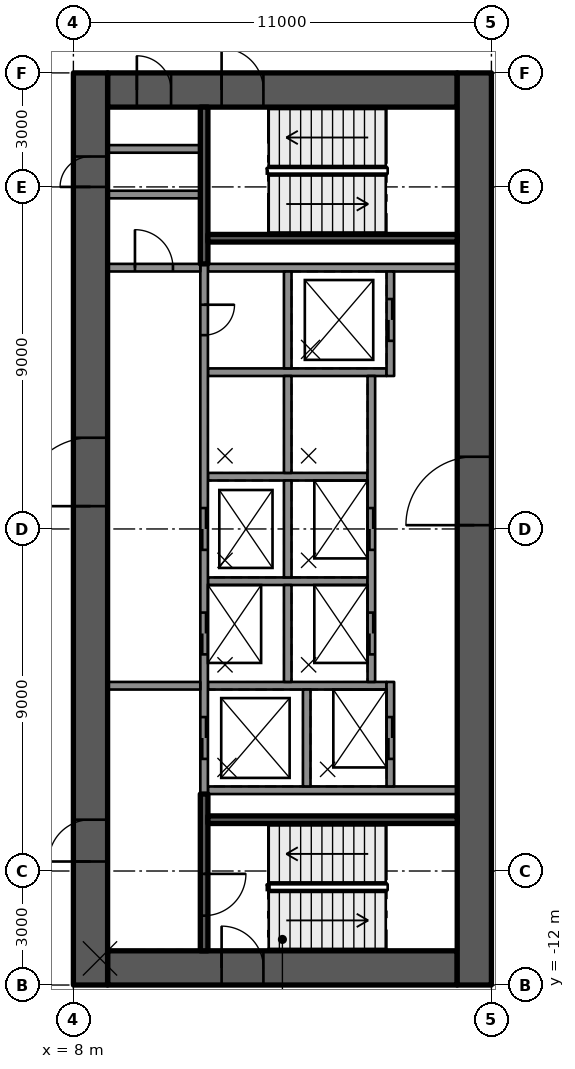
"""IFC4 building model, lengths in metres.
Left out: names, types, materials, properties, quantities, classifications, styles, units other than length and angle.
Written with IfcOpenShell. Run it as: python <this file> out.ifc"""

import sys

from ifc_helpers import new_model, si_unit, direction, frame, frame_2d, origin, place, context, subcontext, project, spatial, rectangle, extrude, element, fill, save


model = new_model("IFC4")
c1 = context("Model", 3, precision=1e-05, world=origin(), true_north=direction((0.0, 1.0)))
c2 = subcontext(c1, "Body", "Model", "MODEL_VIEW")
j1 = project(units=[si_unit("LENGTHUNIT", "METRE"), si_unit("PLANEANGLEUNIT", "RADIAN")], contexts=[c1])
p1 = place(None, origin())
s1 = spatial("IfcSite", under=j1, at=p1, CompositionType="ELEMENT")
p2 = place(p1, origin())
s2 = spatial("IfcBuilding", under=s1, at=p2, CompositionType="ELEMENT")
p3 = place(p2, frame((0.0, 0.0, 54.8)))
s3 = spatial("IfcBuildingStorey", under=s2, at=p3, CompositionType="ELEMENT", Elevation=54.8)
p4 = place(p3, frame((8.9, 11.55, 0.0), z_axis=(0.0, 0.0, 1.0), x_axis=(1.0, 0.0, 0.0)))
e1 = element("IfcWall", 1, at=p4, inside=s3, PredefinedType="SHEAR", context=c2, shape_type="SweptSolid", body=[
    extrude(rectangle(XDim=9.2, YDim=0.9, at=frame_2d((4.6, 0.0))), origin(), (0.0, 0.0, 1.0), 4.0),
])
p5 = place(p4, frame((3.0, 0.0, 0.0)))
e2 = element("IfcOpeningElement", 2, at=p5, cuts=e1, PredefinedType="OPENING", context=c2, shape_type="SweptSolid", body=[
    extrude(rectangle(XDim=1.1, YDim=2.1, at=frame_2d((0.55, 1.05))), frame((0.0, 0.46, 0.0), z_axis=(0.0, -1.0, 0.0), x_axis=(1.0, 0.0, 0.0)), (0.0, 0.0, 1.0), 0.92),
])
p6 = place(p4, frame((0.77, 0.0, 0.0)))
e3 = element("IfcOpeningElement", 3, at=p6, cuts=e1, PredefinedType="OPENING", context=c2, shape_type="SweptSolid", body=[
    extrude(rectangle(XDim=0.9, YDim=2.1, at=frame_2d((0.45, 1.05))), frame((0.0, 0.46, 0.0), z_axis=(0.0, -1.0, 0.0), x_axis=(1.0, 0.0, 0.0)), (0.0, 0.0, 1.0), 0.92),
])
p7 = place(p3, frame((8.9, -11.55, 0.0), z_axis=(0.0, 0.0, 1.0), x_axis=(1.0, 0.0, 0.0)))
e4 = element("IfcWall", 4, at=p7, inside=s3, PredefinedType="SHEAR", context=c2, shape_type="SweptSolid", body=[
    extrude(rectangle(XDim=9.2, YDim=0.9, at=frame_2d((4.6, 0.0))), origin(), (0.0, 0.0, 1.0), 4.0),
])
p8 = place(p7, frame((3.0, 0.0, 0.0)))
e5 = element("IfcOpeningElement", 5, at=p8, cuts=e4, PredefinedType="OPENING", context=c2, shape_type="SweptSolid", body=[
    extrude(rectangle(XDim=1.1, YDim=2.1, at=frame_2d((0.55, 1.05))), frame((0.0, 0.46, 0.0), z_axis=(0.0, -1.0, 0.0), x_axis=(1.0, 0.0, 0.0)), (0.0, 0.0, 1.0), 0.92),
])
p9 = place(p3, frame((8.45, -12.0, 0.0), z_axis=(0.0, 0.0, 1.0), x_axis=(0.0, 1.0, 0.0)))
e6 = element("IfcWall", 6, at=p9, inside=s3, PredefinedType="SHEAR", context=c2, shape_type="SweptSolid", body=[
    extrude(rectangle(XDim=24.0, YDim=0.9, at=frame_2d((12.0, 0.0))), origin(), (0.0, 0.0, 1.0), 4.0),
])
p10 = place(p9, frame((12.6, 0.0, 0.0)))
e7 = element("IfcOpeningElement", 7, at=p10, cuts=e6, PredefinedType="OPENING", context=c2, shape_type="SweptSolid", body=[
    extrude(rectangle(XDim=1.8, YDim=2.1, at=frame_2d((0.9, 1.05))), frame((0.0, 0.46, 0.0), z_axis=(0.0, -1.0, 0.0), x_axis=(1.0, 0.0, 0.0)), (0.0, 0.0, 1.0), 0.92),
])
p11 = place(p9, frame((3.25, 0.0, 0.0)))
e8 = element("IfcOpeningElement", 8, at=p11, cuts=e6, PredefinedType="OPENING", context=c2, shape_type="SweptSolid", body=[
    extrude(rectangle(XDim=1.1, YDim=2.1, at=frame_2d((0.55, 1.05))), frame((0.0, 0.46, 0.0), z_axis=(0.0, -1.0, 0.0), x_axis=(1.0, 0.0, 0.0)), (0.0, 0.0, 1.0), 0.92),
])
p12 = place(p9, frame((21.0, 0.0, 0.0)))
e9 = element("IfcOpeningElement", 9, at=p12, cuts=e6, PredefinedType="OPENING", context=c2, shape_type="SweptSolid", body=[
    extrude(rectangle(XDim=0.8, YDim=2.1, at=frame_2d((0.4, 1.05))), frame((0.0, 0.46, 0.0), z_axis=(0.0, -1.0, 0.0), x_axis=(1.0, 0.0, 0.0)), (0.0, 0.0, 1.0), 0.92),
])
p13 = place(p3, frame((18.55, -12.0, 0.0), z_axis=(0.0, 0.0, 1.0), x_axis=(0.0, 1.0, 0.0)))
e10 = element("IfcWall", 10, at=p13, inside=s3, PredefinedType="SHEAR", context=c2, shape_type="SweptSolid", body=[
    extrude(rectangle(XDim=24.0, YDim=0.9, at=frame_2d((12.0, 0.0))), origin(), (0.0, 0.0, 1.0), 4.0),
])
p14 = place(p13, frame((12.1, 0.0, 0.0)))
e11 = element("IfcOpeningElement", 11, at=p14, cuts=e10, PredefinedType="OPENING", context=c2, shape_type="SweptSolid", body=[
    extrude(rectangle(XDim=1.8, YDim=2.1, at=frame_2d((0.9, 1.05))), frame((0.0, 0.46, 0.0), z_axis=(0.0, -1.0, 0.0), x_axis=(1.0, 0.0, 0.0)), (0.0, 0.0, 1.0), 0.92),
])
for number, where, z_axis, x_axis in (
    (12, (11.54, -6.875, 0.0), (0.0, 0.0, 1.0), (1.0, 0.0, 0.0)),
    (13, (11.54, 6.875, 0.0), (0.0, 0.0, 1.0), (1.0, 0.0, 0.0)),
):
    element("IfcWall", number, at=place(p3, frame(where, z_axis=z_axis, x_axis=x_axis)), inside=s3, PredefinedType="SOLIDWALL", context=c2, shape_type="SweptSolid", body=[
        extrude(rectangle(XDim=6.56, YDim=0.2, at=frame_2d((3.28, 0.0))), origin(), (0.0, 0.0, 1.0), 3.59),
    ])
p15 = place(p3, frame((11.54, 4.125, 0.0), z_axis=(0.0, 0.0, 1.0), x_axis=(1.0, 0.0, 0.0)))
e14 = element("IfcWall", 14, at=p15, inside=s3, PredefinedType="SOLIDWALL", context=c2, shape_type="SweptSolid", body=[
    extrude(rectangle(XDim=4.7, YDim=0.2, at=frame_2d((2.35, 0.0))), origin(), (0.0, 0.0, 1.0), 3.59),
])
for number, where, z_axis, x_axis in (
    (15, (11.54, 1.375, 0.0), (0.0, 0.0, 1.0), (1.0, 0.0, 0.0)),
    (16, (11.54, -1.375, 0.0), (0.0, 0.0, 1.0), (1.0, 0.0, 0.0)),
):
    element("IfcWall", number, at=place(p3, frame(where, z_axis=z_axis, x_axis=x_axis)), inside=s3, PredefinedType="SOLIDWALL", context=c2, shape_type="SweptSolid", body=[
        extrude(rectangle(XDim=4.2, YDim=0.2, at=frame_2d((2.1, 0.0))), origin(), (0.0, 0.0, 1.0), 3.59),
    ])
p16 = place(p3, frame((11.54, -4.125, 0.0), z_axis=(0.0, 0.0, 1.0), x_axis=(1.0, 0.0, 0.0)))
e17 = element("IfcWall", 17, at=p16, inside=s3, PredefinedType="SOLIDWALL", context=c2, shape_type="SweptSolid", body=[
    extrude(rectangle(XDim=4.7, YDim=0.2, at=frame_2d((2.35, 0.0))), origin(), (0.0, 0.0, 1.0), 3.59),
])
p17 = place(p3, frame((11.44, 6.975, 0.0), z_axis=(0.0, 0.0, 1.0), x_axis=(0.0, -1.0, 0.0)))
e18 = element("IfcWall", 18, at=p17, inside=s3, PredefinedType="SOLIDWALL", context=c2, shape_type="SweptSolid", body=[
    extrude(rectangle(XDim=13.95, YDim=0.2, at=frame_2d((6.975, 0.0))), origin(), (0.0, 0.0, 1.0), 3.59),
])
p18 = place(p17, frame((6.425, 0.0, 0.0)))
e19 = element("IfcOpeningElement", 19, at=p18, cuts=e18, PredefinedType="OPENING", context=c2, shape_type="SweptSolid", body=[
    extrude(rectangle(XDim=1.1, YDim=2.1, at=frame_2d((0.55, 1.05))), frame((0.0, 0.11, 0.0), z_axis=(0.0, -1.0, 0.0), x_axis=(1.0, 0.0, 0.0)), (0.0, 0.0, 1.0), 0.22),
])
p19 = place(p17, frame((9.175, 0.0, 0.0)))
e20 = element("IfcOpeningElement", 20, at=p19, cuts=e18, PredefinedType="OPENING", context=c2, shape_type="SweptSolid", body=[
    extrude(rectangle(XDim=1.1, YDim=2.1, at=frame_2d((0.55, 1.05))), frame((0.0, 0.11, 0.0), z_axis=(0.0, -1.0, 0.0), x_axis=(1.0, 0.0, 0.0)), (0.0, 0.0, 1.0), 0.22),
])
p20 = place(p17, frame((11.925, 0.0, 0.0)))
e21 = element("IfcOpeningElement", 21, at=p20, cuts=e18, PredefinedType="OPENING", context=c2, shape_type="SweptSolid", body=[
    extrude(rectangle(XDim=1.1, YDim=2.1, at=frame_2d((0.55, 1.05))), frame((0.0, 0.11, 0.0), z_axis=(0.0, -1.0, 0.0), x_axis=(1.0, 0.0, 0.0)), (0.0, 0.0, 1.0), 0.22),
])
p21 = place(p17, frame((1.075, 0.0, 0.0)))
e22 = element("IfcOpeningElement", 22, at=p21, cuts=e18, PredefinedType="OPENING", context=c2, shape_type="SweptSolid", body=[
    extrude(rectangle(XDim=0.8, YDim=2.1, at=frame_2d((0.4, 1.05))), frame((0.0, 0.11, 0.0), z_axis=(0.0, -1.0, 0.0), x_axis=(1.0, 0.0, 0.0)), (0.0, 0.0, 1.0), 0.22),
])
for number, where, z_axis, x_axis in (
    (23, (13.64, 6.775, 0.0), (0.0, 0.0, 1.0), (0.0, -1.0, 0.0)),
    (24, (13.64, 4.025, 0.0), (0.0, 0.0, 1.0), (0.0, -1.0, 0.0)),
    (25, (13.64, 1.275, 0.0), (0.0, 0.0, 1.0), (0.0, -1.0, 0.0)),
    (26, (13.64, -1.475, 0.0), (0.0, 0.0, 1.0), (0.0, -1.0, 0.0)),
    (27, (14.14, -4.225, 0.0), (0.0, 0.0, 1.0), (0.0, -1.0, 0.0)),
):
    element("IfcWall", number, at=place(p3, frame(where, z_axis=z_axis, x_axis=x_axis)), inside=s3, PredefinedType="SOLIDWALL", context=c2, shape_type="SweptSolid", body=[
        extrude(rectangle(XDim=2.55, YDim=0.2, at=frame_2d((1.275, 0.0))), origin(), (0.0, 0.0, 1.0), 3.59),
    ])
p22 = place(p3, frame((16.34, 6.775, 0.0), z_axis=(0.0, 0.0, 1.0), x_axis=(0.0, -1.0, 0.0)))
e28 = element("IfcWall", 28, at=p22, inside=s3, PredefinedType="SOLIDWALL", context=c2, shape_type="SweptSolid", body=[
    extrude(rectangle(XDim=2.75, YDim=0.2, at=frame_2d((1.375, 0.0))), origin(), (0.0, 0.0, 1.0), 3.59),
])
p23 = place(p22, frame((0.725, 0.0, 0.0)))
e29 = element("IfcOpeningElement", 29, at=p23, cuts=e28, PredefinedType="OPENING", context=c2, shape_type="SweptSolid", body=[
    extrude(rectangle(XDim=1.1, YDim=2.1, at=frame_2d((0.55, 1.05))), frame((0.0, 0.11, 0.0), z_axis=(0.0, -1.0, 0.0), x_axis=(1.0, 0.0, 0.0)), (0.0, 0.0, 1.0), 0.22),
])
p24 = place(p3, frame((15.84, 4.025, 0.0), z_axis=(0.0, 0.0, 1.0), x_axis=(0.0, -1.0, 0.0)))
e30 = element("IfcWall", 30, at=p24, inside=s3, PredefinedType="SOLIDWALL", context=c2, shape_type="SweptSolid", body=[
    extrude(rectangle(XDim=8.05, YDim=0.2, at=frame_2d((4.025, 0.0))), origin(), (0.0, 0.0, 1.0), 3.59),
])
p25 = place(p24, frame((3.475, 0.0, 0.0)))
e31 = element("IfcOpeningElement", 31, at=p25, cuts=e30, PredefinedType="OPENING", context=c2, shape_type="SweptSolid", body=[
    extrude(rectangle(XDim=1.1, YDim=2.1, at=frame_2d((0.55, 1.05))), frame((0.0, 0.11, 0.0), z_axis=(0.0, -1.0, 0.0), x_axis=(1.0, 0.0, 0.0)), (0.0, 0.0, 1.0), 0.22),
])
p26 = place(p24, frame((6.225, 0.0, 0.0)))
e32 = element("IfcOpeningElement", 32, at=p26, cuts=e30, PredefinedType="OPENING", context=c2, shape_type="SweptSolid", body=[
    extrude(rectangle(XDim=1.1, YDim=2.1, at=frame_2d((0.55, 1.05))), frame((0.0, 0.11, 0.0), z_axis=(0.0, -1.0, 0.0), x_axis=(1.0, 0.0, 0.0)), (0.0, 0.0, 1.0), 0.22),
])
p27 = place(p3, frame((16.34, -4.025, 0.0), z_axis=(0.0, 0.0, 1.0), x_axis=(0.0, -1.0, 0.0)))
e33 = element("IfcWall", 33, at=p27, inside=s3, PredefinedType="SOLIDWALL", context=c2, shape_type="SweptSolid", body=[
    extrude(rectangle(XDim=2.75, YDim=0.2, at=frame_2d((1.375, 0.0))), origin(), (0.0, 0.0, 1.0), 3.59),
])
p28 = place(p27, frame((0.925, 0.0, 0.0)))
e34 = element("IfcOpeningElement", 34, at=p28, cuts=e33, PredefinedType="OPENING", context=c2, shape_type="SweptSolid", body=[
    extrude(rectangle(XDim=1.1, YDim=2.1, at=frame_2d((0.55, 1.05))), frame((0.0, 0.11, 0.0), z_axis=(0.0, -1.0, 0.0), x_axis=(1.0, 0.0, 0.0)), (0.0, 0.0, 1.0), 0.22),
])
p29 = place(p3, frame((11.44, -6.975, 0.0), z_axis=(0.0, 0.0, 1.0), x_axis=(0.0, -1.0, 0.0)))
e35 = element("IfcWall", 35, at=p29, inside=s3, PredefinedType="SOLIDWALL", context=c2, shape_type="SweptSolid", body=[
    extrude(rectangle(XDim=4.125, YDim=0.2, at=frame_2d((2.062, 0.0))), origin(), (0.0, 0.0, 1.0), 3.59),
])
p30 = place(p29, frame((2.1, 0.0, 0.0)))
e36 = element("IfcOpeningElement", 36, at=p30, cuts=e35, PredefinedType="OPENING", context=c2, shape_type="SweptSolid", body=[
    extrude(rectangle(XDim=1.1, YDim=2.1, at=frame_2d((0.55, 1.05))), frame((0.0, 0.11, 0.0), z_axis=(0.0, -1.0, 0.0), x_axis=(1.0, 0.0, 0.0)), (0.0, 0.0, 1.0), 0.22),
])
p31 = place(p3, frame((11.54, -7.65, 0.0), z_axis=(0.0, 0.0, 1.0), x_axis=(1.0, 0.0, 0.0)))
e37 = element("IfcWall", 37, at=p31, inside=s3, PredefinedType="SOLIDWALL", context=c2, shape_type="SweptSolid", body=[
    extrude(rectangle(XDim=6.56, YDim=0.2, at=frame_2d((3.28, 0.0))), origin(), (0.0, 0.0, 1.0), 3.59),
])
p32 = place(p3, frame((11.44, 11.1, 0.0), z_axis=(0.0, 0.0, 1.0), x_axis=(0.0, -1.0, 0.0)))
e38 = element("IfcWall", 38, at=p32, inside=s3, PredefinedType="SOLIDWALL", context=c2, shape_type="SweptSolid", body=[
    extrude(rectangle(XDim=4.125, YDim=0.2, at=frame_2d((2.062, 0.0))), origin(), (0.0, 0.0, 1.0), 3.59),
])
p33 = place(p3, frame((11.54, 7.65, 0.0), z_axis=(0.0, 0.0, 1.0), x_axis=(1.0, 0.0, 0.0)))
e39 = element("IfcWall", 39, at=p33, inside=s3, PredefinedType="SOLIDWALL", context=c2, shape_type="SweptSolid", body=[
    extrude(rectangle(XDim=6.56, YDim=0.2, at=frame_2d((3.28, 0.0))), origin(), (0.0, 0.0, 1.0), 3.59),
])
p34 = place(p3, frame((8.9, -4.125, 0.0), z_axis=(0.0, 0.0, 1.0), x_axis=(1.0, 0.0, 0.0)))
e40 = element("IfcWall", 40, at=p34, inside=s3, PredefinedType="PARTITIONING", context=c2, shape_type="SweptSolid", body=[
    extrude(rectangle(XDim=2.44, YDim=0.2, at=frame_2d((1.22, 0.0))), origin(), (0.0, 0.0, 1.0), 3.59),
])
p35 = place(p3, frame((8.9, 6.875, 0.0), z_axis=(0.0, 0.0, 1.0), x_axis=(1.0, 0.0, 0.0)))
e41 = element("IfcWall", 41, at=p35, inside=s3, PredefinedType="PARTITIONING", context=c2, shape_type="SweptSolid", body=[
    extrude(rectangle(XDim=2.44, YDim=0.2, at=frame_2d((1.22, 0.0))), origin(), (0.0, 0.0, 1.0), 3.59),
])
p36 = place(p35, frame((0.72, 0.0, 0.0)))
e42 = element("IfcOpeningElement", 42, at=p36, cuts=e41, PredefinedType="OPENING", context=c2, shape_type="SweptSolid", body=[
    extrude(rectangle(XDim=1.0, YDim=2.1, at=frame_2d((0.5, 1.05))), frame((0.0, 0.11, 0.0), z_axis=(0.0, -1.0, 0.0), x_axis=(1.0, 0.0, 0.0)), (0.0, 0.0, 1.0), 0.22),
])
for number, where, z_axis, x_axis in (
    (43, (8.9, 10.0, 0.0), (0.0, 0.0, 1.0), (1.0, 0.0, 0.0)),
    (44, (8.9, 8.8, 0.0), (0.0, 0.0, 1.0), (1.0, 0.0, 0.0)),
):
    element("IfcWall", number, at=place(p3, frame(where, z_axis=z_axis, x_axis=x_axis)), inside=s3, PredefinedType="PARTITIONING", context=c2, shape_type="SweptSolid", body=[
        extrude(rectangle(XDim=2.44, YDim=0.2, at=frame_2d((1.22, 0.0))), origin(), (0.0, 0.0, 1.0), 3.59),
    ])
p37 = place(p23, origin())
e45 = element("IfcDoor", 45, at=p37, inside=s3, OperationType="DOUBLE_DOOR_SLIDING", PredefinedType="DOOR", context=c2, shape_type="SweptSolid", body=[
    extrude(rectangle(XDim=1.1, YDim=2.1, at=frame_2d((0.55, 1.05))), frame((0.0, 0.025, 0.0), z_axis=(0.0, -1.0, 0.0), x_axis=(1.0, 0.0, 0.0)), (0.0, 0.0, 1.0), 0.05),
])
fill(e29, e45)
p38 = place(p18, origin())
e46 = element("IfcDoor", 46, at=p38, inside=s3, OperationType="DOUBLE_DOOR_SLIDING", PredefinedType="DOOR", context=c2, shape_type="SweptSolid", body=[
    extrude(rectangle(XDim=1.1, YDim=2.1, at=frame_2d((0.55, 1.05))), frame((0.0, 0.025, 0.0), z_axis=(0.0, -1.0, 0.0), x_axis=(1.0, 0.0, 0.0)), (0.0, 0.0, 1.0), 0.05),
])
fill(e19, e46)
p39 = place(p25, origin())
e47 = element("IfcDoor", 47, at=p39, inside=s3, OperationType="DOUBLE_DOOR_SLIDING", PredefinedType="DOOR", context=c2, shape_type="SweptSolid", body=[
    extrude(rectangle(XDim=1.1, YDim=2.1, at=frame_2d((0.55, 1.05))), frame((0.0, 0.025, 0.0), z_axis=(0.0, -1.0, 0.0), x_axis=(1.0, 0.0, 0.0)), (0.0, 0.0, 1.0), 0.05),
])
fill(e31, e47)
p40 = place(p19, origin())
e48 = element("IfcDoor", 48, at=p40, inside=s3, OperationType="DOUBLE_DOOR_SLIDING", PredefinedType="DOOR", context=c2, shape_type="SweptSolid", body=[
    extrude(rectangle(XDim=1.1, YDim=2.1, at=frame_2d((0.55, 1.05))), frame((0.0, 0.025, 0.0), z_axis=(0.0, -1.0, 0.0), x_axis=(1.0, 0.0, 0.0)), (0.0, 0.0, 1.0), 0.05),
])
fill(e20, e48)
p41 = place(p26, origin())
e49 = element("IfcDoor", 49, at=p41, inside=s3, OperationType="DOUBLE_DOOR_SLIDING", PredefinedType="DOOR", context=c2, shape_type="SweptSolid", body=[
    extrude(rectangle(XDim=1.1, YDim=2.1, at=frame_2d((0.55, 1.05))), frame((0.0, 0.025, 0.0), z_axis=(0.0, -1.0, 0.0), x_axis=(1.0, 0.0, 0.0)), (0.0, 0.0, 1.0), 0.05),
])
fill(e32, e49)
p42 = place(p20, origin())
e50 = element("IfcDoor", 50, at=p42, inside=s3, OperationType="DOUBLE_DOOR_SLIDING", PredefinedType="DOOR", context=c2, shape_type="SweptSolid", body=[
    extrude(rectangle(XDim=1.1, YDim=2.1, at=frame_2d((0.55, 1.05))), frame((0.0, 0.025, 0.0), z_axis=(0.0, -1.0, 0.0), x_axis=(1.0, 0.0, 0.0)), (0.0, 0.0, 1.0), 0.05),
])
fill(e21, e50)
p43 = place(p28, origin())
e51 = element("IfcDoor", 51, at=p43, inside=s3, OperationType="DOUBLE_DOOR_SLIDING", PredefinedType="DOOR", context=c2, shape_type="SweptSolid", body=[
    extrude(rectangle(XDim=1.1, YDim=2.1, at=frame_2d((0.55, 1.05))), frame((0.0, 0.025, 0.0), z_axis=(0.0, -1.0, 0.0), x_axis=(1.0, 0.0, 0.0)), (0.0, 0.0, 1.0), 0.05),
])
fill(e34, e51)
p44 = place(p21, origin())
e52 = element("IfcDoor", 52, at=p44, inside=s3, OperationType="SINGLE_SWING_LEFT", PredefinedType="DOOR", context=c2, shape_type="SweptSolid", body=[
    extrude(rectangle(XDim=0.8, YDim=2.1, at=frame_2d((0.4, 1.05))), frame((0.0, 0.025, 0.0), z_axis=(0.0, -1.0, 0.0), x_axis=(1.0, 0.0, 0.0)), (0.0, 0.0, 1.0), 0.05),
])
fill(e22, e52)
p45 = place(p10, origin())
e53 = element("IfcDoor", 53, at=p45, inside=s3, OperationType="SINGLE_SWING_RIGHT", PredefinedType="DOOR", context=c2, shape_type="SweptSolid", body=[
    extrude(rectangle(XDim=1.8, YDim=2.1, at=frame_2d((0.9, 1.05))), frame((0.0, 0.025, 0.0), z_axis=(0.0, -1.0, 0.0), x_axis=(1.0, 0.0, 0.0)), (0.0, 0.0, 1.0), 0.05),
])
fill(e7, e53)
p46 = place(p14, origin())
e54 = element("IfcDoor", 54, at=p46, inside=s3, OperationType="SINGLE_SWING_RIGHT", PredefinedType="DOOR", context=c2, shape_type="SweptSolid", body=[
    extrude(rectangle(XDim=1.8, YDim=2.1, at=frame_2d((0.9, 1.05))), frame((0.0, 0.025, 0.0), z_axis=(0.0, -1.0, 0.0), x_axis=(1.0, 0.0, 0.0)), (0.0, 0.0, 1.0), 0.05),
])
fill(e11, e54)
p47 = place(p11, origin())
e55 = element("IfcDoor", 55, at=p47, inside=s3, OperationType="SINGLE_SWING_LEFT", PredefinedType="DOOR", context=c2, shape_type="SweptSolid", body=[
    extrude(rectangle(XDim=1.1, YDim=2.1, at=frame_2d((0.55, 1.05))), frame((0.0, 0.025, 0.0), z_axis=(0.0, -1.0, 0.0), x_axis=(1.0, 0.0, 0.0)), (0.0, 0.0, 1.0), 0.05),
])
fill(e8, e55)
p48 = place(p8, origin())
e56 = element("IfcDoor", 56, at=p48, inside=s3, OperationType="SINGLE_SWING_LEFT", PredefinedType="DOOR", context=c2, shape_type="SweptSolid", body=[
    extrude(rectangle(XDim=1.1, YDim=2.1, at=frame_2d((0.55, 1.05))), frame((0.0, 0.025, 0.0), z_axis=(0.0, -1.0, 0.0), x_axis=(1.0, 0.0, 0.0)), (0.0, 0.0, 1.0), 0.05),
])
fill(e5, e56)
p49 = place(p5, origin())
e57 = element("IfcDoor", 57, at=p49, inside=s3, OperationType="SINGLE_SWING_LEFT", PredefinedType="DOOR", context=c2, shape_type="SweptSolid", body=[
    extrude(rectangle(XDim=1.1, YDim=2.1, at=frame_2d((0.55, 1.05))), frame((0.0, 0.025, 0.0), z_axis=(0.0, -1.0, 0.0), x_axis=(1.0, 0.0, 0.0)), (0.0, 0.0, 1.0), 0.05),
])
fill(e2, e57)
p50 = place(p30, origin())
e58 = element("IfcDoor", 58, at=p50, inside=s3, OperationType="SINGLE_SWING_RIGHT", PredefinedType="DOOR", context=c2, shape_type="SweptSolid", body=[
    extrude(rectangle(XDim=1.1, YDim=2.1, at=frame_2d((0.55, 1.05))), frame((0.0, 0.025, 0.0), z_axis=(0.0, -1.0, 0.0), x_axis=(1.0, 0.0, 0.0)), (0.0, 0.0, 1.0), 0.05),
])
fill(e36, e58)
p51 = place(p6, origin())
e59 = element("IfcDoor", 59, at=p51, inside=s3, OperationType="SINGLE_SWING_LEFT", PredefinedType="DOOR", context=c2, shape_type="SweptSolid", body=[
    extrude(rectangle(XDim=0.9, YDim=2.1, at=frame_2d((0.45, 1.05))), frame((0.0, 0.025, 0.0), z_axis=(0.0, -1.0, 0.0), x_axis=(1.0, 0.0, 0.0)), (0.0, 0.0, 1.0), 0.05),
])
fill(e3, e59)
p52 = place(p12, origin())
e60 = element("IfcDoor", 60, at=p52, inside=s3, OperationType="SINGLE_SWING_RIGHT", PredefinedType="DOOR", context=c2, shape_type="SweptSolid", body=[
    extrude(rectangle(XDim=0.8, YDim=2.1, at=frame_2d((0.4, 1.05))), frame((0.0, 0.025, 0.0), z_axis=(0.0, -1.0, 0.0), x_axis=(1.0, 0.0, 0.0)), (0.0, 0.0, 1.0), 0.05),
])
fill(e9, e60)
p53 = place(p36, origin())
e61 = element("IfcDoor", 61, at=p53, inside=s3, OperationType="SINGLE_SWING_RIGHT", PredefinedType="DOOR", context=c2, shape_type="SweptSolid", body=[
    extrude(rectangle(XDim=1.0, YDim=2.1, at=frame_2d((0.5, 1.05))), frame((0.0, 0.025, 0.0), z_axis=(0.0, -1.0, 0.0), x_axis=(1.0, 0.0, 0.0)), (0.0, 0.0, 1.0), 0.05),
])
fill(e42, e61)
save(model, sys.argv[1])
